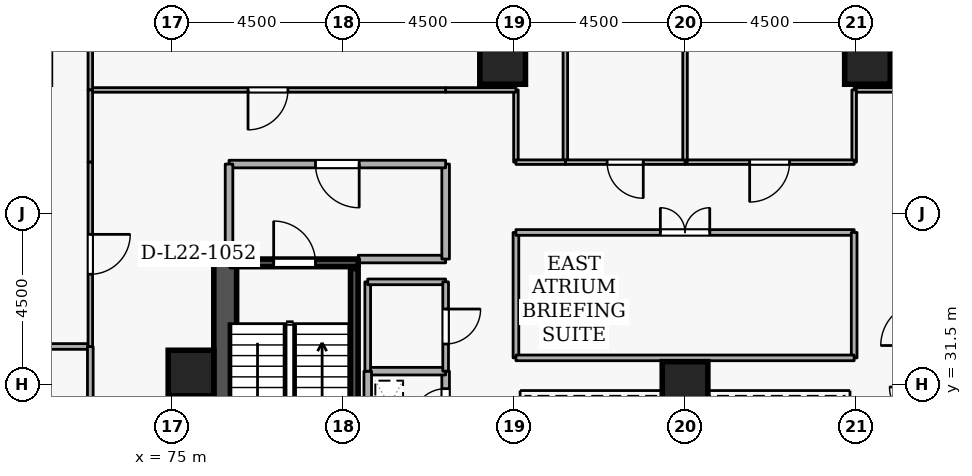
"""IFC4 building model, lengths in metres.
Left out: names, types, materials, properties, quantities, classifications, styles, units other than length and angle.
Written with IfcOpenShell. Run it as: python <this file> out.ifc"""

import sys

from ifc_helpers import new_model, si_unit, direction, frame, frame_2d, origin, origin_2d, place, context, subcontext, project, spatial, rectangle, extrude, element, fill, save


model = new_model("IFC4")
c1 = context("Model", 3, precision=1e-05, world=origin(), true_north=direction((0.0, 1.0)))
c2 = subcontext(c1, "Body", "Model", "MODEL_VIEW")
j1 = project(units=[si_unit("LENGTHUNIT", "METRE"), si_unit("PLANEANGLEUNIT", "RADIAN")], contexts=[c1])
p1 = place(None, origin())
s1 = spatial("IfcSite", under=j1, at=p1, CompositionType="ELEMENT")
p2 = place(p1, origin())
s2 = spatial("IfcBuilding", under=s1, at=p2, CompositionType="ELEMENT")
p3 = place(p2, frame((0.0, 0.0, 87.3)))
s3 = spatial("IfcBuildingStorey", under=s2, at=p3, CompositionType="ELEMENT", Elevation=87.3)
p4 = place(p3, frame((76.4, 19.2, 0.0), z_axis=(0.0, 0.0, 1.0), x_axis=(0.0, 1.0, 0.0)))
e1 = element("IfcWall", 1, at=p4, inside=s3, PredefinedType="SHEAR", context=c2, shape_type="SweptSolid", body=[
    extrude(rectangle(XDim=15.6, YDim=0.6, at=frame_2d((7.8, 0.0))), origin(), (0.0, 0.0, 1.0), 3.6),
])
for number, where, z_axis, x_axis in (
    (2, (93.3, 40.0, 0.0), (0.0, 0.0, 1.0), (1.0, 0.0, 0.0)),
    (3, (83.7, 40.0, 0.0), (0.0, 0.0, 1.0), (1.0, 0.0, 0.0)),
    (4, (75.5, 31.8, 0.0), (0.0, 0.0, 1.0), (1.0, 0.0, 0.0)),
    (5, (88.5, 31.5, 0.0), (0.0, 0.0, 1.0), (1.0, 0.0, 0.0)),
):
    element("IfcColumn", number, at=place(p3, frame(where, z_axis=z_axis, x_axis=x_axis)), inside=s3, PredefinedType="COLUMN", context=c2, shape_type="SweptSolid", body=[
        extrude(rectangle(XDim=1.2, YDim=1.2, at=origin_2d()), origin(), (0.0, 0.0, 1.0), 3.6),
    ])
p5 = place(p3, frame((76.55, 34.7, 0.0), z_axis=(0.0, 0.0, 1.0), x_axis=(1.0, 0.0, 0.0)))
e6 = element("IfcWall", 6, at=p5, inside=s3, PredefinedType="SHEAR", context=c2, shape_type="SweptSolid", body=[
    extrude(rectangle(XDim=3.35, YDim=0.2, at=frame_2d((1.675, 0.0))), origin(), (0.0, 0.0, 1.0), 3.6),
])
p6 = place(p5, frame((1.125, 0.0, 0.0)))
e7 = element("IfcOpeningElement", 7, at=p6, cuts=e6, PredefinedType="OPENING", context=c2, shape_type="SweptSolid", body=[
    extrude(rectangle(XDim=1.1, YDim=2.1, at=frame_2d((0.55, 1.05))), frame((0.0, 0.11, 0.0), z_axis=(0.0, -1.0, 0.0), x_axis=(1.0, 0.0, 0.0)), (0.0, 0.0, 1.0), 0.22),
])
p7 = place(p3, frame((79.797, 27.45, 0.0), z_axis=(0.0, 0.0, 1.0), x_axis=(0.0, 1.0, 0.0)))
e8 = element("IfcWall", 8, at=p7, inside=s3, PredefinedType="SHEAR", context=c2, shape_type="SweptSolid", body=[
    extrude(rectangle(XDim=7.1, YDim=0.2, at=frame_2d((3.55, 0.0))), origin(), (0.0, 0.0, 1.0), 3.6),
])
p8 = place(p3, frame((79.9, 34.8, 0.0), z_axis=(0.0, 0.0, 1.0), x_axis=(1.0, 0.0, 0.0)))
e9 = element("IfcWall", 9, at=p8, inside=s3, PredefinedType="STANDARD", context=c2, shape_type="SweptSolid", body=[
    extrude(rectangle(XDim=2.3, YDim=0.2, at=frame_2d((1.15, 0.0))), origin(), (0.0, 0.0, 1.0), 2.545),
])
p9 = place(p3, frame((82.2, 34.8, 0.0), z_axis=(0.0, 0.0, 1.0), x_axis=(0.0, 1.0, 0.0)))
e10 = element("IfcWall", 10, at=p9, inside=s3, PredefinedType="STANDARD", context=c2, shape_type="SweptSolid", body=[
    extrude(rectangle(XDim=2.5, YDim=0.2, at=frame_2d((1.25, 0.0))), origin(), (0.0, 0.0, 1.0), 3.34),
])
p10 = place(p3, frame((82.2, 37.3, 0.0), z_axis=(0.0, 0.0, 1.0), x_axis=(-1.0, 0.0, 0.0)))
e11 = element("IfcWall", 11, at=p10, inside=s3, PredefinedType="STANDARD", context=c2, shape_type="SweptSolid", body=[
    extrude(rectangle(XDim=5.7, YDim=0.2, at=frame_2d((2.85, 0.0))), origin(), (0.0, 0.0, 1.0), 3.34),
])
p11 = place(p10, frame((2.275, 0.0, 0.0)))
e12 = element("IfcOpeningElement", 12, at=p11, cuts=e11, PredefinedType="OPENING", context=c2, shape_type="SweptSolid", body=[
    extrude(rectangle(XDim=1.15, YDim=2.1, at=frame_2d((0.575, 1.05))), frame((0.0, 0.11, 0.0), z_axis=(0.0, -1.0, 0.0), x_axis=(1.0, 0.0, 0.0)), (0.0, 0.0, 1.0), 0.22),
])
p12 = place(p3, frame((76.5, 37.3, 0.0), z_axis=(0.0, 0.0, 1.0), x_axis=(0.0, -1.0, 0.0)))
e13 = element("IfcWall", 13, at=p12, inside=s3, PredefinedType="STANDARD", context=c2, shape_type="SweptSolid", body=[
    extrude(rectangle(XDim=2.5, YDim=0.2, at=frame_2d((1.25, 0.0))), origin(), (0.0, 0.0, 1.0), 3.34),
])
p13 = place(p3, frame((82.2, 30.05, 0.0), z_axis=(0.0, 0.0, 1.0), x_axis=(0.0, 1.0, 0.0)))
e14 = element("IfcWall", 14, at=p13, inside=s3, PredefinedType="STANDARD", context=c2, shape_type="SweptSolid", body=[
    extrude(rectangle(XDim=1.8, YDim=0.2, at=frame_2d((0.9, 0.0))), origin(), (0.0, 0.0, 1.0), 3.34),
])
p14 = place(p13, frame((0.46, 0.0, 0.0)))
e15 = element("IfcOpeningElement", 15, at=p14, cuts=e14, PredefinedType="OPENING", context=c2, shape_type="SweptSolid", body=[
    extrude(rectangle(XDim=0.88, YDim=2.04, at=frame_2d((0.44, 1.02))), frame((0.0, 0.11, 0.0), z_axis=(0.0, -1.0, 0.0), x_axis=(1.0, 0.0, 0.0)), (0.0, 0.0, 1.0), 0.22),
])
p15 = place(p3, frame((82.2, 31.85, 0.0), z_axis=(0.0, 0.0, 1.0), x_axis=(-1.0, 0.0, 0.0)))
e16 = element("IfcWall", 16, at=p15, inside=s3, PredefinedType="STANDARD", context=c2, shape_type="SweptSolid", body=[
    extrude(rectangle(XDim=2.05, YDim=0.2, at=frame_2d((1.025, 0.0))), origin(), (0.0, 0.0, 1.0), 3.34),
])
p16 = place(p3, frame((80.15, 31.85, 0.0), z_axis=(0.0, 0.0, 1.0), x_axis=(0.0, -1.0, 0.0)))
e17 = element("IfcWall", 17, at=p16, inside=s3, PredefinedType="STANDARD", context=c2, shape_type="SweptSolid", body=[
    extrude(rectangle(XDim=1.8, YDim=0.2, at=frame_2d((0.9, 0.0))), origin(), (0.0, 0.0, 1.0), 3.34),
])
p17 = place(p3, frame((80.15, 31.85, 0.0), z_axis=(0.0, 0.0, 1.0), x_axis=(0.0, 1.0, 0.0)))
e18 = element("IfcWall", 18, at=p17, inside=s3, PredefinedType="PARTITIONING", context=c2, shape_type="SweptSolid", body=[
    extrude(rectangle(XDim=2.35, YDim=0.15, at=frame_2d((1.175, 0.0))), origin(), (0.0, 0.0, 1.0), 3.34),
])
p18 = place(p3, frame((80.15, 34.2, 0.0), z_axis=(0.0, 0.0, 1.0), x_axis=(1.0, 0.0, 0.0)))
e19 = element("IfcWall", 19, at=p18, inside=s3, PredefinedType="PARTITIONING", context=c2, shape_type="SweptSolid", body=[
    extrude(rectangle(XDim=2.05, YDim=0.15, at=frame_2d((1.025, 0.0))), origin(), (0.0, 0.0, 1.0), 2.545),
])
p19 = place(p3, frame((82.2, 34.2, 0.0), z_axis=(0.0, 0.0, 1.0), x_axis=(0.0, -1.0, 0.0)))
e20 = element("IfcWall", 20, at=p19, inside=s3, PredefinedType="PARTITIONING", context=c2, shape_type="SweptSolid", body=[
    extrude(rectangle(XDim=2.35, YDim=0.15, at=frame_2d((1.175, 0.0))), origin(), (0.0, 0.0, 1.0), 3.34),
])
p20 = place(p19, frame((0.715, 0.0, 0.0)))
e21 = element("IfcOpeningElement", 21, at=p20, cuts=e20, PredefinedType="OPENING", context=c2, shape_type="SweptSolid", body=[
    extrude(rectangle(XDim=0.92, YDim=2.08, at=frame_2d((0.46, 1.04))), frame((0.0, 0.085, 0.0), z_axis=(0.0, -1.0, 0.0), x_axis=(1.0, 0.0, 0.0)), (0.0, 0.0, 1.0), 0.17),
])
p21 = place(p3, frame((94.8, 39.25, 0.0), z_axis=(0.0, 0.0, 1.0), x_axis=(-1.0, 0.0, 0.0)))
e22 = element("IfcWall", 22, at=p21, inside=s3, PredefinedType="PARTITIONING", context=c2, shape_type="SweptSolid", body=[
    extrude(rectangle(XDim=1.85, YDim=0.12, at=frame_2d((0.925, 0.0))), origin(), (0.0, 0.0, 1.0), 3.34),
])
p22 = place(p3, frame((92.95, 39.25, 0.0), z_axis=(0.0, 0.0, 1.0), x_axis=(0.0, -1.0, 0.0)))
e23 = element("IfcWall", 23, at=p22, inside=s3, PredefinedType="PARTITIONING", context=c2, shape_type="SweptSolid", body=[
    extrude(rectangle(XDim=1.9, YDim=0.12, at=frame_2d((0.95, 0.0))), origin(), (0.0, 0.0, 1.0), 3.34),
])
p23 = place(p3, frame((92.95, 37.35, 0.0), z_axis=(0.0, 0.0, 1.0), x_axis=(-1.0, 0.0, 0.0)))
e24 = element("IfcWall", 24, at=p23, inside=s3, PredefinedType="PARTITIONING", context=c2, shape_type="SweptSolid", body=[
    extrude(rectangle(XDim=4.45, YDim=0.12, at=frame_2d((2.225, 0.0))), origin(), (0.0, 0.0, 1.0), 3.34),
])
p24 = place(p23, frame((1.7, 0.0, 0.0)))
e25 = element("IfcOpeningElement", 25, at=p24, cuts=e24, PredefinedType="OPENING", context=c2, shape_type="SweptSolid", body=[
    extrude(rectangle(XDim=1.05, YDim=2.1, at=frame_2d((0.525, 1.05))), frame((0.0, 0.07, 0.0), z_axis=(0.0, -1.0, 0.0), x_axis=(1.0, 0.0, 0.0)), (0.0, 0.0, 1.0), 0.14),
])
p25 = place(p3, frame((88.5, 37.35, 0.0), z_axis=(0.0, 0.0, 1.0), x_axis=(0.0, 1.0, 0.0)))
e26 = element("IfcWall", 26, at=p25, inside=s3, PredefinedType="PARTITIONING", context=c2, shape_type="SweptSolid", body=[
    extrude(rectangle(XDim=13.57, YDim=0.12, at=frame_2d((6.785, 0.0))), origin(), (0.0, 0.0, 1.0), 2.932),
])
p26 = place(p3, frame((85.35, 37.35, 0.0), z_axis=(0.0, 0.0, 1.0), x_axis=(0.0, 1.0, 0.0)))
e27 = element("IfcWall", 27, at=p26, inside=s3, PredefinedType="PARTITIONING", context=c2, shape_type="SweptSolid", body=[
    extrude(rectangle(XDim=13.57, YDim=0.12, at=frame_2d((6.785, 0.0))), origin(), (0.0, 0.0, 1.0), 3.34),
])
p27 = place(p3, frame((88.5, 37.35, 0.0), z_axis=(0.0, 0.0, 1.0), x_axis=(-1.0, 0.0, 0.0)))
e28 = element("IfcWall", 28, at=p27, inside=s3, PredefinedType="PARTITIONING", context=c2, shape_type="SweptSolid", body=[
    extrude(rectangle(XDim=3.15, YDim=0.12, at=frame_2d((1.575, 0.0))), origin(), (0.0, 0.0, 1.0), 3.34),
])
p28 = place(p27, frame((1.1, 0.0, 0.0)))
e29 = element("IfcOpeningElement", 29, at=p28, cuts=e28, PredefinedType="OPENING", context=c2, shape_type="SweptSolid", body=[
    extrude(rectangle(XDim=0.95, YDim=2.1, at=frame_2d((0.475, 1.05))), frame((0.0, 0.07, 0.0), z_axis=(0.0, -1.0, 0.0), x_axis=(1.0, 0.0, 0.0)), (0.0, 0.0, 1.0), 0.14),
])
p29 = place(p3, frame((84.05, 37.35, 0.0), z_axis=(0.0, 0.0, 1.0), x_axis=(0.0, 1.0, 0.0)))
e30 = element("IfcWall", 30, at=p29, inside=s3, PredefinedType="PARTITIONING", context=c2, shape_type="SweptSolid", body=[
    extrude(rectangle(XDim=1.9, YDim=0.12, at=frame_2d((0.95, 0.0))), origin(), (0.0, 0.0, 1.0), 3.34),
])
p30 = place(p3, frame((84.05, 39.25, 0.0), z_axis=(0.0, 0.0, 1.0), x_axis=(-1.0, 0.0, 0.0)))
e31 = element("IfcWall", 31, at=p30, inside=s3, PredefinedType="PARTITIONING", context=c2, shape_type="SweptSolid", body=[
    extrude(rectangle(XDim=1.85, YDim=0.12, at=frame_2d((0.925, 0.0))), origin(), (0.0, 0.0, 1.0), 3.34),
])
p31 = place(p3, frame((82.2, 39.25, 0.0), z_axis=(0.0, 0.0, 1.0), x_axis=(-1.0, 0.0, 0.0)))
e32 = element("IfcWall", 32, at=p31, inside=s3, PredefinedType="PARTITIONING", context=c2, shape_type="SweptSolid", body=[
    extrude(rectangle(XDim=9.35, YDim=0.12, at=frame_2d((4.675, 0.0))), origin(), (0.0, 0.0, 1.0), 3.34),
])
p32 = place(p31, frame((4.15, 0.0, 0.0)))
e33 = element("IfcOpeningElement", 33, at=p32, cuts=e32, PredefinedType="OPENING", context=c2, shape_type="SweptSolid", body=[
    extrude(rectangle(XDim=1.05, YDim=2.1, at=frame_2d((0.525, 1.05))), frame((0.0, 0.07, 0.0), z_axis=(0.0, -1.0, 0.0), x_axis=(1.0, 0.0, 0.0)), (0.0, 0.0, 1.0), 0.14),
])
p33 = place(p3, frame((72.85, 39.25, 0.0), z_axis=(0.0, 0.0, 1.0), x_axis=(0.0, 1.0, 0.0)))
e34 = element("IfcWall", 34, at=p33, inside=s3, PredefinedType="PARTITIONING", context=c2, shape_type="SweptSolid", body=[
    extrude(rectangle(XDim=11.67, YDim=0.12, at=frame_2d((5.835, 0.0))), origin(), (0.0, 0.0, 1.0), 3.34),
])
p34 = place(p3, frame((85.35, 37.35, 0.0), z_axis=(0.0, 0.0, 1.0), x_axis=(-1.0, 0.0, 0.0)))
e35 = element("IfcWall", 35, at=p34, inside=s3, PredefinedType="PARTITIONING", context=c2, shape_type="SweptSolid", body=[
    extrude(rectangle(XDim=1.3, YDim=0.12, at=frame_2d((0.65, 0.0))), origin(), (0.0, 0.0, 1.0), 3.34),
])
p35 = place(p3, frame((84.05, 32.2, 0.0), z_axis=(0.0, 0.0, 1.0), x_axis=(0.0, 1.0, 0.0)))
e36 = element("IfcWall", 36, at=p35, inside=s3, PredefinedType="PARTITIONING", context=c2, shape_type="SweptSolid", body=[
    extrude(rectangle(XDim=3.3, YDim=0.15, at=frame_2d((1.65, 0.0))), origin(), (0.0, 0.0, 1.0), 3.34),
])
p36 = place(p3, frame((84.05, 35.5, 0.0), z_axis=(0.0, 0.0, 1.0), x_axis=(1.0, 0.0, 0.0)))
e37 = element("IfcWall", 37, at=p36, inside=s3, PredefinedType="PARTITIONING", context=c2, shape_type="SweptSolid", body=[
    extrude(rectangle(XDim=8.9, YDim=0.15, at=frame_2d((4.45, 0.0))), origin(), (0.0, 0.0, 1.0), 3.34),
])
p37 = place(p36, frame((3.8, 0.0, 0.0)))
e38 = element("IfcOpeningElement", 38, at=p37, cuts=e37, PredefinedType="OPENING", context=c2, shape_type="SweptSolid", body=[
    extrude(rectangle(XDim=1.3, YDim=2.12, at=frame_2d((0.65, 1.06))), frame((0.0, 0.085, 0.0), z_axis=(0.0, -1.0, 0.0), x_axis=(1.0, 0.0, 0.0)), (0.0, 0.0, 1.0), 0.17),
])
p38 = place(p3, frame((92.95, 35.5, 0.0), z_axis=(0.0, 0.0, 1.0), x_axis=(0.0, -1.0, 0.0)))
e39 = element("IfcWall", 39, at=p38, inside=s3, PredefinedType="PARTITIONING", context=c2, shape_type="SweptSolid", body=[
    extrude(rectangle(XDim=3.3, YDim=0.15, at=frame_2d((1.65, 0.0))), origin(), (0.0, 0.0, 1.0), 3.34),
])
p39 = place(p3, frame((92.95, 32.2, 0.0), z_axis=(0.0, 0.0, 1.0), x_axis=(-1.0, 0.0, 0.0)))
e40 = element("IfcWall", 40, at=p39, inside=s3, PredefinedType="PARTITIONING", context=c2, shape_type="SweptSolid", body=[
    extrude(rectangle(XDim=8.9, YDim=0.15, at=frame_2d((4.45, 0.0))), origin(), (0.0, 0.0, 1.0), 3.34),
])
p40 = place(p3, frame((64.58, 32.5, 0.0), z_axis=(0.0, 0.0, 1.0), x_axis=(1.0, 0.0, 0.0)))
e41 = element("IfcWall", 41, at=p40, inside=s3, PredefinedType="PARTITIONING", context=c2, shape_type="SweptSolid", body=[
    extrude(rectangle(XDim=8.27, YDim=0.15, at=frame_2d((4.135, 0.0))), origin(), (0.0, 0.0, 1.0), 3.34),
])
p41 = place(p3, frame((72.85, 32.5, 0.0), z_axis=(0.0, 0.0, 1.0), x_axis=(0.0, -1.0, 0.0)))
e42 = element("IfcWall", 42, at=p41, inside=s3, PredefinedType="PARTITIONING", context=c2, shape_type="SweptSolid", body=[
    extrude(rectangle(XDim=11.0, YDim=0.15, at=frame_2d((5.5, 0.0))), origin(), (0.0, 0.0, 1.0), 3.34),
])
p42 = place(p41, frame((3.31, 0.0, 0.0)))
e43 = element("IfcOpeningElement", 43, at=p42, cuts=e42, PredefinedType="OPENING", context=c2, shape_type="SweptSolid", body=[
    extrude(rectangle(XDim=1.3, YDim=2.12, at=frame_2d((0.65, 1.06))), frame((0.0, 0.085, 0.0), z_axis=(0.0, -1.0, 0.0), x_axis=(1.0, 0.0, 0.0)), (0.0, 0.0, 1.0), 0.17),
])
p43 = place(p3, frame((72.85, 39.25, 0.0), z_axis=(0.0, 0.0, 1.0), x_axis=(0.0, -1.0, 0.0)))
e44 = element("IfcWall", 44, at=p43, inside=s3, PredefinedType="PARTITIONING", context=c2, shape_type="SweptSolid", body=[
    extrude(rectangle(XDim=1.9, YDim=0.12, at=frame_2d((0.95, 0.0))), origin(), (0.0, 0.0, 1.0), 2.895),
])
p44 = place(p3, frame((72.85, 37.35, 0.0), z_axis=(0.0, 0.0, 1.0), x_axis=(0.0, -1.0, 0.0)))
e45 = element("IfcWall", 45, at=p44, inside=s3, PredefinedType="PARTITIONING", context=c2, shape_type="SweptSolid", body=[
    extrude(rectangle(XDim=4.85, YDim=0.12, at=frame_2d((2.425, 0.0))), origin(), (0.0, 0.0, 1.0), 2.895),
])
p45 = place(p44, frame((1.9, 0.0, 0.0)))
e46 = element("IfcOpeningElement", 46, at=p45, cuts=e45, PredefinedType="OPENING", context=c2, shape_type="SweptSolid", body=[
    extrude(rectangle(XDim=1.05, YDim=2.1, at=frame_2d((0.525, 1.05))), frame((0.0, 0.07, 0.0), z_axis=(0.0, -1.0, 0.0), x_axis=(1.0, 0.0, 0.0)), (0.0, 0.0, 1.0), 0.14),
])
p46 = place(p6, origin())
e47 = element("IfcDoor", 47, at=p46, inside=s3, OperationType="SINGLE_SWING_LEFT", PredefinedType="DOOR", context=c2, shape_type="SweptSolid", body=[
    extrude(rectangle(XDim=1.1, YDim=2.1, at=frame_2d((0.55, 1.05))), frame((0.0, 0.025, 0.0), z_axis=(0.0, -1.0, 0.0), x_axis=(1.0, 0.0, 0.0)), (0.0, 0.0, 1.0), 0.05),
])
fill(e7, e47)
p47 = place(p11, origin())
e48 = element("IfcDoor", 48, at=p47, inside=s3, OperationType="SINGLE_SWING_LEFT", PredefinedType="DOOR", context=c2, shape_type="SweptSolid", body=[
    extrude(rectangle(XDim=1.15, YDim=2.1, at=frame_2d((0.575, 1.05))), frame((0.0, 0.025, 0.0), z_axis=(0.0, -1.0, 0.0), x_axis=(1.0, 0.0, 0.0)), (0.0, 0.0, 1.0), 0.05),
])
fill(e12, e48)
p48 = place(p14, origin())
e49 = element("IfcDoor", 49, at=p48, inside=s3, OperationType="SINGLE_SWING_LEFT", PredefinedType="DOOR", context=c2, shape_type="SweptSolid", body=[
    extrude(rectangle(XDim=0.88, YDim=2.04, at=frame_2d((0.44, 1.02))), frame((0.0, 0.025, 0.0), z_axis=(0.0, -1.0, 0.0), x_axis=(1.0, 0.0, 0.0)), (0.0, 0.0, 1.0), 0.05),
])
fill(e15, e49)
p49 = place(p20, origin())
e50 = element("IfcDoor", 50, at=p49, inside=s3, OperationType="SINGLE_SWING_LEFT", PredefinedType="DOOR", context=c2, shape_type="SweptSolid", body=[
    extrude(rectangle(XDim=0.92, YDim=2.08, at=frame_2d((0.46, 1.04))), frame((0.0, 0.025, 0.0), z_axis=(0.0, -1.0, 0.0), x_axis=(1.0, 0.0, 0.0)), (0.0, 0.0, 1.0), 0.05),
])
fill(e21, e50)
p50 = place(p24, origin())
e51 = element("IfcDoor", 51, at=p50, inside=s3, OperationType="SINGLE_SWING_RIGHT", PredefinedType="DOOR", context=c2, shape_type="SweptSolid", body=[
    extrude(rectangle(XDim=1.05, YDim=2.1, at=frame_2d((0.525, 1.05))), frame((0.0, 0.025, 0.0), z_axis=(0.0, -1.0, 0.0), x_axis=(1.0, 0.0, 0.0)), (0.0, 0.0, 1.0), 0.05),
])
fill(e25, e51)
p51 = place(p28, origin())
e52 = element("IfcDoor", 52, at=p51, inside=s3, OperationType="SINGLE_SWING_LEFT", PredefinedType="DOOR", context=c2, shape_type="SweptSolid", body=[
    extrude(rectangle(XDim=0.95, YDim=2.1, at=frame_2d((0.475, 1.05))), frame((0.0, 0.025, 0.0), z_axis=(0.0, -1.0, 0.0), x_axis=(1.0, 0.0, 0.0)), (0.0, 0.0, 1.0), 0.05),
])
fill(e29, e52)
p52 = place(p32, origin())
e53 = element("IfcDoor", 53, at=p52, inside=s3, OperationType="SINGLE_SWING_RIGHT", PredefinedType="DOOR", context=c2, shape_type="SweptSolid", body=[
    extrude(rectangle(XDim=1.05, YDim=2.1, at=frame_2d((0.525, 1.05))), frame((0.0, 0.025, 0.0), z_axis=(0.0, -1.0, 0.0), x_axis=(1.0, 0.0, 0.0)), (0.0, 0.0, 1.0), 0.05),
])
fill(e33, e53)
p53 = place(p37, origin())
e54 = element("IfcDoor", 54, at=p53, inside=s3, OperationType="DOUBLE_DOOR_SINGLE_SWING", PredefinedType="DOOR", context=c2, shape_type="SweptSolid", body=[
    extrude(rectangle(XDim=1.3, YDim=2.12, at=frame_2d((0.65, 1.06))), frame((0.0, 0.025, 0.0), z_axis=(0.0, -1.0, 0.0), x_axis=(1.0, 0.0, 0.0)), (0.0, 0.0, 1.0), 0.05),
])
fill(e38, e54)
p54 = place(p45, origin())
e55 = element("IfcDoor", 55, at=p54, inside=s3, OperationType="SINGLE_SWING_LEFT", PredefinedType="DOOR", context=c2, shape_type="SweptSolid", body=[
    extrude(rectangle(XDim=1.05, YDim=2.1, at=frame_2d((0.525, 1.05))), frame((0.0, 0.025, 0.0), z_axis=(0.0, -1.0, 0.0), x_axis=(1.0, 0.0, 0.0)), (0.0, 0.0, 1.0), 0.05),
])
fill(e46, e55)
save(model, sys.argv[1])
